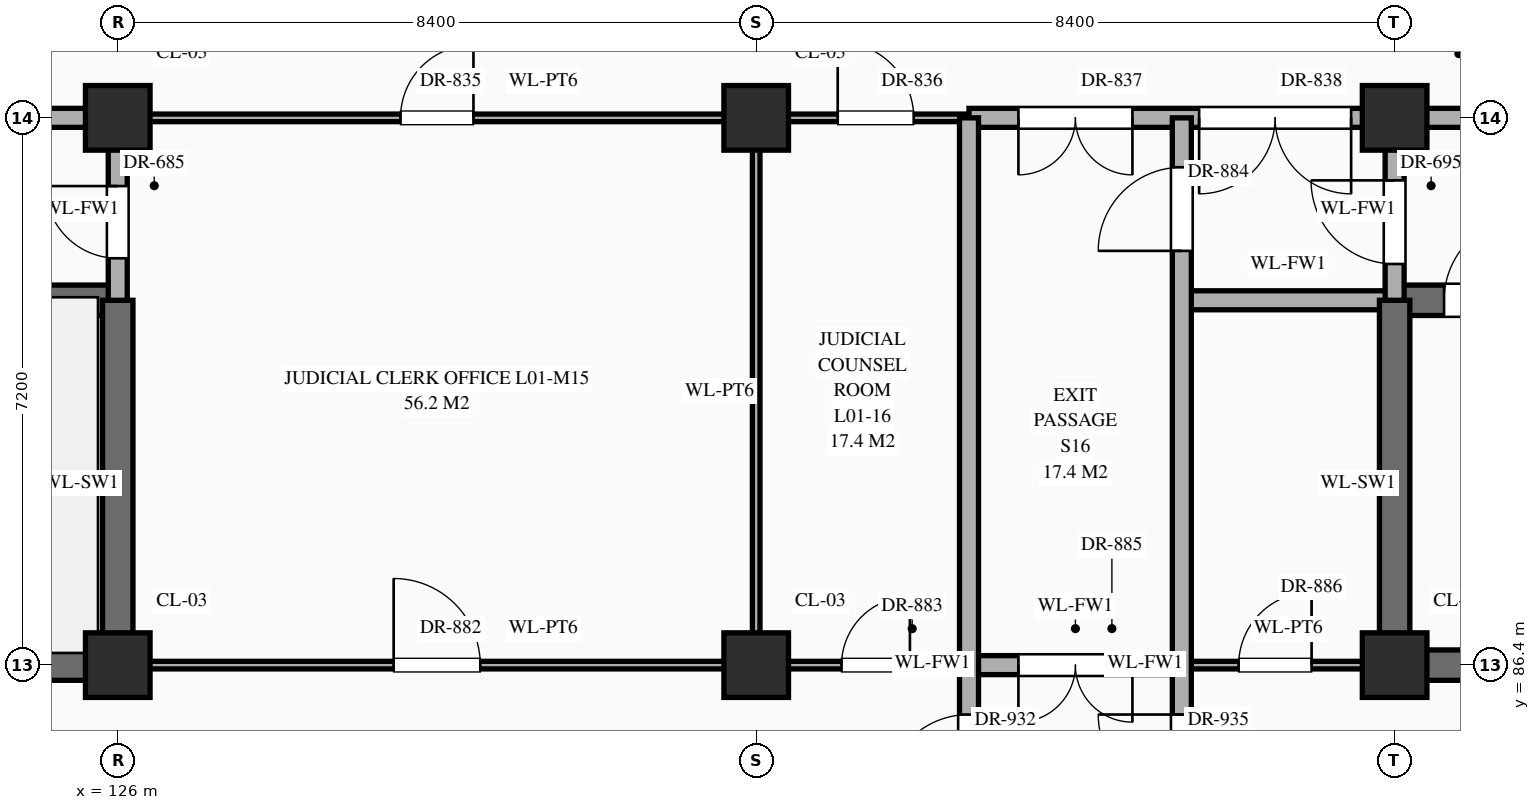
"""IFC4 building model, lengths in metres.
Left out: names, types, materials, properties, quantities, classifications, styles, units other than length and angle.
Written with IfcOpenShell. Run it as: python <this file> out.ifc"""

import sys

from ifc_helpers import new_model, si_unit, direction, frame, frame_2d, origin, origin_2d, place, context, subcontext, project, spatial, rectangle, extrude, element, fill, save


model = new_model("IFC4")
c1 = context("Model", 3, precision=1e-05, world=origin(), true_north=direction((0.0, 1.0)))
c2 = subcontext(c1, "Body", "Model", "MODEL_VIEW")
j1 = project(units=[si_unit("LENGTHUNIT", "METRE"), si_unit("PLANEANGLEUNIT", "RADIAN")], contexts=[c1])
p1 = place(None, origin())
s1 = spatial("IfcSite", under=j1, at=p1, CompositionType="ELEMENT")
p2 = place(p1, origin())
s2 = spatial("IfcBuilding", under=s1, at=p2, CompositionType="ELEMENT")
p3 = place(p2, origin())
s3 = spatial("IfcBuildingStorey", under=s2, at=p3, CompositionType="ELEMENT", Elevation=0.0)
for number, where, z_axis, x_axis in (
    (1, (126.0, 86.4, 0.0), (0.0, 0.0, 1.0), (1.0, 0.0, 0.0)),
    (2, (126.0, 93.6, 0.0), (0.0, 0.0, 1.0), (1.0, 0.0, 0.0)),
    (3, (134.4, 86.4, 0.0), (0.0, 0.0, 1.0), (1.0, 0.0, 0.0)),
    (4, (134.4, 93.6, 0.0), (0.0, 0.0, 1.0), (1.0, 0.0, 0.0)),
    (5, (142.8, 86.4, 0.0), (0.0, 0.0, 1.0), (1.0, 0.0, 0.0)),
    (6, (142.8, 93.6, 0.0), (0.0, 0.0, 1.0), (1.0, 0.0, 0.0)),
):
    element("IfcColumn", number, at=place(p3, frame(where, z_axis=z_axis, x_axis=x_axis)), inside=s3, PredefinedType="COLUMN", context=c2, shape_type="SweptSolid", body=[
        extrude(rectangle(XDim=0.85, YDim=0.85, at=origin_2d()), origin(), (0.0, 0.0, 1.0), 5.4),
    ])
p4 = place(p3, frame((117.6, 86.4, 0.0), z_axis=(0.0, 0.0, 1.0), x_axis=(1.0, 0.0, 0.0)))
e7 = element("IfcWall", 7, at=p4, inside=s3, PredefinedType="SHEAR", context=c2, shape_type="SweptSolid", body=[
    extrude(rectangle(XDim=8.4, YDim=0.4, at=frame_2d((4.2, 0.0))), origin(), (0.0, 0.0, 1.0), 5.12),
])
p5 = place(p3, frame((126.0, 86.4, 0.0), z_axis=(0.0, 0.0, 1.0), x_axis=(1.0, 0.0, 0.0)))
e8 = element("IfcWall", 8, at=p5, inside=s3, PredefinedType="STANDARD", context=c2, shape_type="SweptSolid", body=[
    extrude(rectangle(XDim=11.2, YDim=0.1, at=frame_2d((5.6, 0.0))), origin(), (0.0, 0.0, 1.0), 4.27),
])
p6 = place(p5, frame((3.63, 0.0, 0.0)))
e9 = element("IfcOpeningElement", 9, at=p6, cuts=e8, PredefinedType="OPENING", context=c2, shape_type="SweptSolid", body=[
    extrude(rectangle(XDim=1.14, YDim=2.4, at=frame_2d((0.57, 1.2))), frame((0.0, 0.062, 0.0), z_axis=(0.0, -1.0, 0.0), x_axis=(1.0, 0.0, 0.0)), (0.0, 0.0, 1.0), 0.124),
])
p7 = place(p5, frame((9.522, 0.0, 0.0)))
e10 = element("IfcOpeningElement", 10, at=p7, cuts=e8, PredefinedType="OPENING", context=c2, shape_type="SweptSolid", body=[
    extrude(rectangle(XDim=0.9, YDim=2.15, at=frame_2d((0.45, 1.075))), frame((0.0, 0.062, 0.0), z_axis=(0.0, -1.0, 0.0), x_axis=(1.0, 0.0, 0.0)), (0.0, 0.0, 1.0), 0.124),
])
p8 = place(p3, frame((137.2, 86.4, 0.0), z_axis=(0.0, 0.0, 1.0), x_axis=(1.0, 0.0, 0.0)))
e11 = element("IfcWall", 11, at=p8, inside=s3, PredefinedType="STANDARD", context=c2, shape_type="SweptSolid", body=[
    extrude(rectangle(XDim=2.8, YDim=0.25, at=frame_2d((1.4, 0.0))), origin(), (0.0, 0.0, 1.0), 4.27),
])
p9 = place(p8, frame((0.65, 0.0, 0.0)))
e12 = element("IfcOpeningElement", 12, at=p9, cuts=e11, PredefinedType="OPENING", context=c2, shape_type="SweptSolid", body=[
    extrude(rectangle(XDim=1.5, YDim=2.25, at=frame_2d((0.75, 1.125))), frame((0.0, 0.137, 0.0), z_axis=(0.0, -1.0, 0.0), x_axis=(1.0, 0.0, 0.0)), (0.0, 0.0, 1.0), 0.274),
])
p10 = place(p3, frame((140.0, 86.4, 0.0), z_axis=(0.0, 0.0, 1.0), x_axis=(1.0, 0.0, 0.0)))
e13 = element("IfcWall", 13, at=p10, inside=s3, PredefinedType="STANDARD", context=c2, shape_type="SweptSolid", body=[
    extrude(rectangle(XDim=2.8, YDim=0.1, at=frame_2d((1.4, 0.0))), origin(), (0.0, 0.0, 1.0), 4.27),
])
p11 = place(p10, frame((0.748, 0.0, 0.0)))
e14 = element("IfcOpeningElement", 14, at=p11, cuts=e13, PredefinedType="OPENING", context=c2, shape_type="SweptSolid", body=[
    extrude(rectangle(XDim=0.96, YDim=2.2, at=frame_2d((0.48, 1.1))), frame((0.0, 0.062, 0.0), z_axis=(0.0, -1.0, 0.0), x_axis=(1.0, 0.0, 0.0)), (0.0, 0.0, 1.0), 0.124),
])
p12 = place(p3, frame((142.8, 86.4, 0.0), z_axis=(0.0, 0.0, 1.0), x_axis=(1.0, 0.0, 0.0)))
e15 = element("IfcWall", 15, at=p12, inside=s3, PredefinedType="SHEAR", context=c2, shape_type="SweptSolid", body=[
    extrude(rectangle(XDim=8.4, YDim=0.4, at=frame_2d((4.2, 0.0))), origin(), (0.0, 0.0, 1.0), 5.12),
])
p13 = place(p3, frame((117.6, 91.2, 0.0), z_axis=(0.0, 0.0, 1.0), x_axis=(1.0, 0.0, 0.0)))
e16 = element("IfcWall", 16, at=p13, inside=s3, PredefinedType="SHEAR", context=c2, shape_type="SweptSolid", body=[
    extrude(rectangle(XDim=8.4, YDim=0.4, at=frame_2d((4.2, 0.0))), origin(), (0.0, 0.0, 1.0), 5.12),
])
p14 = place(p13, frame((0.65, 0.0, 0.0)))
e17 = element("IfcOpeningElement", 17, at=p14, cuts=e16, PredefinedType="OPENING", context=c2, shape_type="SweptSolid", body=[
    extrude(rectangle(XDim=1.1, YDim=2.2, at=frame_2d((0.55, 1.1))), frame((0.0, 0.212, 0.0), z_axis=(0.0, -1.0, 0.0), x_axis=(1.0, 0.0, 0.0)), (0.0, 0.0, 1.0), 0.424),
])
p15 = place(p3, frame((140.0, 91.2, 0.0), z_axis=(0.0, 0.0, 1.0), x_axis=(1.0, 0.0, 0.0)))
e18 = element("IfcWall", 18, at=p15, inside=s3, PredefinedType="STANDARD", context=c2, shape_type="SweptSolid", body=[
    extrude(rectangle(XDim=2.8, YDim=0.25, at=frame_2d((1.4, 0.0))), origin(), (0.0, 0.0, 1.0), 5.12),
])
p16 = place(p3, frame((142.8, 91.2, 0.0), z_axis=(0.0, 0.0, 1.0), x_axis=(1.0, 0.0, 0.0)))
e19 = element("IfcWall", 19, at=p16, inside=s3, PredefinedType="SHEAR", context=c2, shape_type="SweptSolid", body=[
    extrude(rectangle(XDim=8.4, YDim=0.4, at=frame_2d((4.2, 0.0))), origin(), (0.0, 0.0, 1.0), 5.12),
])
p17 = place(p16, frame((0.65, 0.0, 0.0)))
e20 = element("IfcOpeningElement", 20, at=p17, cuts=e19, PredefinedType="OPENING", context=c2, shape_type="SweptSolid", body=[
    extrude(rectangle(XDim=1.1, YDim=2.2, at=frame_2d((0.55, 1.1))), frame((0.0, 0.212, 0.0), z_axis=(0.0, -1.0, 0.0), x_axis=(1.0, 0.0, 0.0)), (0.0, 0.0, 1.0), 0.424),
])
p18 = place(p3, frame((100.8, 93.6, 0.0), z_axis=(0.0, 0.0, 1.0), x_axis=(1.0, 0.0, 0.0)))
e21 = element("IfcWall", 21, at=p18, inside=s3, PredefinedType="STANDARD", context=c2, shape_type="SweptSolid", body=[
    extrude(rectangle(XDim=25.2, YDim=0.25, at=frame_2d((12.6, 0.0))), origin(), (0.0, 0.0, 1.0), 4.27),
])
p19 = place(p18, frame((3.2, 0.0, 0.0)))
e22 = element("IfcOpeningElement", 22, at=p19, cuts=e21, PredefinedType="OPENING", context=c2, shape_type="SweptSolid", body=[
    extrude(rectangle(XDim=2.0, YDim=2.4, at=frame_2d((1.0, 1.2))), frame((0.0, 0.137, 0.0), z_axis=(0.0, -1.0, 0.0), x_axis=(1.0, 0.0, 0.0)), (0.0, 0.0, 1.0), 0.274),
])
p20 = place(p18, frame((20.212, 0.0, 0.0)))
e23 = element("IfcOpeningElement", 23, at=p20, cuts=e21, PredefinedType="OPENING", context=c2, shape_type="SweptSolid", body=[
    extrude(rectangle(XDim=1.6, YDim=2.3, at=frame_2d((0.8, 1.15))), frame((0.0, 0.137, 0.0), z_axis=(0.0, -1.0, 0.0), x_axis=(1.0, 0.0, 0.0)), (0.0, 0.0, 1.0), 0.274),
])
p21 = place(p18, frame((9.485, 0.0, 0.0)))
e24 = element("IfcOpeningElement", 24, at=p21, cuts=e21, PredefinedType="OPENING", context=c2, shape_type="SweptSolid", body=[
    extrude(rectangle(XDim=1.0, YDim=2.2, at=frame_2d((0.5, 1.1))), frame((0.0, 0.137, 0.0), z_axis=(0.0, -1.0, 0.0), x_axis=(1.0, 0.0, 0.0)), (0.0, 0.0, 1.0), 0.274),
])
p22 = place(p18, frame((12.125, 0.0, 0.0)))
e25 = element("IfcOpeningElement", 25, at=p22, cuts=e21, PredefinedType="OPENING", context=c2, shape_type="SweptSolid", body=[
    extrude(rectangle(XDim=0.95, YDim=2.15, at=frame_2d((0.475, 1.075))), frame((0.0, 0.137, 0.0), z_axis=(0.0, -1.0, 0.0), x_axis=(1.0, 0.0, 0.0)), (0.0, 0.0, 1.0), 0.274),
])
p23 = place(p18, frame((14.665, 0.0, 0.0)))
e26 = element("IfcOpeningElement", 26, at=p23, cuts=e21, PredefinedType="OPENING", context=c2, shape_type="SweptSolid", body=[
    extrude(rectangle(XDim=1.1, YDim=2.2, at=frame_2d((0.55, 1.1))), frame((0.0, 0.137, 0.0), z_axis=(0.0, -1.0, 0.0), x_axis=(1.0, 0.0, 0.0)), (0.0, 0.0, 1.0), 0.274),
])
p24 = place(p3, frame((126.0, 93.6, 0.0), z_axis=(0.0, 0.0, 1.0), x_axis=(1.0, 0.0, 0.0)))
e27 = element("IfcWall", 27, at=p24, inside=s3, PredefinedType="STANDARD", context=c2, shape_type="SweptSolid", body=[
    extrude(rectangle(XDim=11.2, YDim=0.1, at=frame_2d((5.6, 0.0))), origin(), (0.0, 0.0, 1.0), 4.27),
])
p25 = place(p24, frame((3.72, 0.0, 0.0)))
e28 = element("IfcOpeningElement", 28, at=p25, cuts=e27, PredefinedType="OPENING", context=c2, shape_type="SweptSolid", body=[
    extrude(rectangle(XDim=0.96, YDim=2.2, at=frame_2d((0.48, 1.1))), frame((0.0, 0.062, 0.0), z_axis=(0.0, -1.0, 0.0), x_axis=(1.0, 0.0, 0.0)), (0.0, 0.0, 1.0), 0.124),
])
p26 = place(p24, frame((9.472, 0.0, 0.0)))
e29 = element("IfcOpeningElement", 29, at=p26, cuts=e27, PredefinedType="OPENING", context=c2, shape_type="SweptSolid", body=[
    extrude(rectangle(XDim=1.0, YDim=2.25, at=frame_2d((0.5, 1.125))), frame((0.0, 0.062, 0.0), z_axis=(0.0, -1.0, 0.0), x_axis=(1.0, 0.0, 0.0)), (0.0, 0.0, 1.0), 0.124),
])
p27 = place(p3, frame((137.2, 93.6, 0.0), z_axis=(0.0, 0.0, 1.0), x_axis=(1.0, 0.0, 0.0)))
e30 = element("IfcWall", 30, at=p27, inside=s3, PredefinedType="STANDARD", context=c2, shape_type="SweptSolid", body=[
    extrude(rectangle(XDim=14.0, YDim=0.25, at=frame_2d((7.0, 0.0))), origin(), (0.0, 0.0, 1.0), 4.27),
])
p28 = place(p27, frame((8.8, 0.0, 0.0)))
e31 = element("IfcOpeningElement", 31, at=p28, cuts=e30, PredefinedType="OPENING", context=c2, shape_type="SweptSolid", body=[
    extrude(rectangle(XDim=2.0, YDim=2.4, at=frame_2d((1.0, 1.2))), frame((0.0, 0.137, 0.0), z_axis=(0.0, -1.0, 0.0), x_axis=(1.0, 0.0, 0.0)), (0.0, 0.0, 1.0), 0.274),
])
p29 = place(p27, frame((0.65, 0.0, 0.0)))
e32 = element("IfcOpeningElement", 32, at=p29, cuts=e30, PredefinedType="OPENING", context=c2, shape_type="SweptSolid", body=[
    extrude(rectangle(XDim=1.5, YDim=2.25, at=frame_2d((0.75, 1.125))), frame((0.0, 0.137, 0.0), z_axis=(0.0, -1.0, 0.0), x_axis=(1.0, 0.0, 0.0)), (0.0, 0.0, 1.0), 0.274),
])
p30 = place(p27, frame((3.028, 0.0, 0.0)))
e33 = element("IfcOpeningElement", 33, at=p30, cuts=e30, PredefinedType="OPENING", context=c2, shape_type="SweptSolid", body=[
    extrude(rectangle(XDim=2.0, YDim=2.4, at=frame_2d((1.0, 1.2))), frame((0.0, 0.137, 0.0), z_axis=(0.0, -1.0, 0.0), x_axis=(1.0, 0.0, 0.0)), (0.0, 0.0, 1.0), 0.274),
])
p31 = place(p3, frame((126.0, 86.4, 0.0), z_axis=(0.0, 0.0, 1.0), x_axis=(0.0, 1.0, 0.0)))
e34 = element("IfcWall", 34, at=p31, inside=s3, PredefinedType="SHEAR", context=c2, shape_type="SweptSolid", body=[
    extrude(rectangle(XDim=4.8, YDim=0.4, at=frame_2d((2.4, 0.0))), origin(), (0.0, 0.0, 1.0), 5.12),
])
p32 = place(p3, frame((126.0, 91.2, 0.0), z_axis=(0.0, 0.0, 1.0), x_axis=(0.0, 1.0, 0.0)))
e35 = element("IfcWall", 35, at=p32, inside=s3, PredefinedType="STANDARD", context=c2, shape_type="SweptSolid", body=[
    extrude(rectangle(XDim=2.4, YDim=0.25, at=frame_2d((1.2, 0.0))), origin(), (0.0, 0.0, 1.0), 4.37),
])
p33 = place(p32, frame((0.552, 0.0, 0.0)))
e36 = element("IfcOpeningElement", 36, at=p33, cuts=e35, PredefinedType="OPENING", context=c2, shape_type="SweptSolid", body=[
    extrude(rectangle(XDim=0.95, YDim=2.15, at=frame_2d((0.475, 1.075))), frame((0.0, 0.137, 0.0), z_axis=(0.0, -1.0, 0.0), x_axis=(1.0, 0.0, 0.0)), (0.0, 0.0, 1.0), 0.274),
])
p34 = place(p3, frame((134.4, 86.4, 0.0), z_axis=(0.0, 0.0, 1.0), x_axis=(0.0, 1.0, 0.0)))
e37 = element("IfcWall", 37, at=p34, inside=s3, PredefinedType="STANDARD", context=c2, shape_type="SweptSolid", body=[
    extrude(rectangle(XDim=7.2, YDim=0.1, at=frame_2d((3.6, 0.0))), origin(), (0.0, 0.0, 1.0), 4.37),
])
p35 = place(p3, frame((137.2, 79.24, 0.0), z_axis=(0.0, 0.0, 1.0), x_axis=(0.0, 1.0, 0.0)))
e38 = element("IfcWall", 38, at=p35, inside=s3, PredefinedType="STANDARD", context=c2, shape_type="SweptSolid", body=[
    extrude(rectangle(XDim=14.36, YDim=0.25, at=frame_2d((7.18, 0.0))), origin(), (0.0, 0.0, 1.0), 5.12),
])
p36 = place(p35, frame((5.41, 0.0, 0.0)))
e39 = element("IfcOpeningElement", 39, at=p36, cuts=e38, PredefinedType="OPENING", context=c2, shape_type="SweptSolid", body=[
    extrude(rectangle(XDim=1.1, YDim=2.2, at=frame_2d((0.55, 1.1))), frame((0.0, 0.137, 0.0), z_axis=(0.0, -1.0, 0.0), x_axis=(1.0, 0.0, 0.0)), (0.0, 0.0, 1.0), 0.274),
])
p37 = place(p3, frame((140.0, 79.24, 0.0), z_axis=(0.0, 0.0, 1.0), x_axis=(0.0, 1.0, 0.0)))
e40 = element("IfcWall", 40, at=p37, inside=s3, PredefinedType="STANDARD", context=c2, shape_type="SweptSolid", body=[
    extrude(rectangle(XDim=14.36, YDim=0.25, at=frame_2d((7.18, 0.0))), origin(), (0.0, 0.0, 1.0), 5.12),
])
p38 = place(p37, frame((12.61, 0.0, 0.0)))
e41 = element("IfcOpeningElement", 41, at=p38, cuts=e40, PredefinedType="OPENING", context=c2, shape_type="SweptSolid", body=[
    extrude(rectangle(XDim=1.1, YDim=2.2, at=frame_2d((0.55, 1.1))), frame((0.0, 0.137, 0.0), z_axis=(0.0, -1.0, 0.0), x_axis=(1.0, 0.0, 0.0)), (0.0, 0.0, 1.0), 0.274),
])
p39 = place(p37, frame((5.41, 0.0, 0.0)))
e42 = element("IfcOpeningElement", 42, at=p39, cuts=e40, PredefinedType="OPENING", context=c2, shape_type="SweptSolid", body=[
    extrude(rectangle(XDim=1.1, YDim=2.2, at=frame_2d((0.55, 1.1))), frame((0.0, 0.137, 0.0), z_axis=(0.0, -1.0, 0.0), x_axis=(1.0, 0.0, 0.0)), (0.0, 0.0, 1.0), 0.274),
])
p40 = place(p3, frame((142.8, 86.4, 0.0), z_axis=(0.0, 0.0, 1.0), x_axis=(0.0, 1.0, 0.0)))
e43 = element("IfcWall", 43, at=p40, inside=s3, PredefinedType="SHEAR", context=c2, shape_type="SweptSolid", body=[
    extrude(rectangle(XDim=4.8, YDim=0.4, at=frame_2d((2.4, 0.0))), origin(), (0.0, 0.0, 1.0), 5.12),
])
p41 = place(p3, frame((142.8, 91.2, 0.0), z_axis=(0.0, 0.0, 1.0), x_axis=(0.0, 1.0, 0.0)))
e44 = element("IfcWall", 44, at=p41, inside=s3, PredefinedType="STANDARD", context=c2, shape_type="SweptSolid", body=[
    extrude(rectangle(XDim=2.4, YDim=0.25, at=frame_2d((1.2, 0.0))), origin(), (0.0, 0.0, 1.0), 4.37),
])
p42 = place(p41, frame((0.478, 0.0, 0.0)))
e45 = element("IfcOpeningElement", 45, at=p42, cuts=e44, PredefinedType="OPENING", context=c2, shape_type="SweptSolid", body=[
    extrude(rectangle(XDim=1.1, YDim=2.2, at=frame_2d((0.55, 1.1))), frame((0.0, 0.137, 0.0), z_axis=(0.0, -1.0, 0.0), x_axis=(1.0, 0.0, 0.0)), (0.0, 0.0, 1.0), 0.274),
])
p43 = place(p17, origin())
e46 = element("IfcDoor", 46, at=p43, inside=s3, OperationType="SINGLE_SWING_RIGHT", PredefinedType="DOOR", context=c2, shape_type="SweptSolid", body=[
    extrude(rectangle(XDim=1.1, YDim=2.2, at=frame_2d((0.55, 1.1))), frame((0.0, 0.025, 0.0), z_axis=(0.0, -1.0, 0.0), x_axis=(1.0, 0.0, 0.0)), (0.0, 0.0, 1.0), 0.05),
])
fill(e20, e46)
p44 = place(p33, origin())
e47 = element("IfcDoor", 47, at=p44, inside=s3, OperationType="SINGLE_SWING_RIGHT", PredefinedType="DOOR", context=c2, shape_type="SweptSolid", body=[
    extrude(rectangle(XDim=0.95, YDim=2.15, at=frame_2d((0.475, 1.075))), frame((0.0, 0.025, 0.0), z_axis=(0.0, -1.0, 0.0), x_axis=(1.0, 0.0, 0.0)), (0.0, 0.0, 1.0), 0.05),
])
fill(e36, e47)
p45 = place(p42, origin())
e48 = element("IfcDoor", 48, at=p45, inside=s3, OperationType="SINGLE_SWING_RIGHT", PredefinedType="DOOR", context=c2, shape_type="SweptSolid", body=[
    extrude(rectangle(XDim=1.1, YDim=2.2, at=frame_2d((0.55, 1.1))), frame((0.0, 0.025, 0.0), z_axis=(0.0, -1.0, 0.0), x_axis=(1.0, 0.0, 0.0)), (0.0, 0.0, 1.0), 0.05),
])
fill(e45, e48)
p46 = place(p25, origin())
e49 = element("IfcDoor", 49, at=p46, inside=s3, OperationType="SINGLE_SWING_RIGHT", PredefinedType="DOOR", context=c2, shape_type="SweptSolid", body=[
    extrude(rectangle(XDim=0.96, YDim=2.2, at=frame_2d((0.48, 1.1))), frame((0.0, 0.025, 0.0), z_axis=(0.0, -1.0, 0.0), x_axis=(1.0, 0.0, 0.0)), (0.0, 0.0, 1.0), 0.05),
])
fill(e28, e49)
p47 = place(p26, origin())
e50 = element("IfcDoor", 50, at=p47, inside=s3, OperationType="SINGLE_SWING_LEFT", PredefinedType="DOOR", context=c2, shape_type="SweptSolid", body=[
    extrude(rectangle(XDim=1.0, YDim=2.25, at=frame_2d((0.5, 1.125))), frame((0.0, 0.025, 0.0), z_axis=(0.0, -1.0, 0.0), x_axis=(1.0, 0.0, 0.0)), (0.0, 0.0, 1.0), 0.05),
])
fill(e29, e50)
p48 = place(p29, frame((1.5, 0.0, 0.0), z_axis=(0.0, 0.0, 1.0), x_axis=(-1.0, 0.0, 0.0)))
e51 = element("IfcDoor", 51, at=p48, inside=s3, OperationType="DOUBLE_DOOR_SINGLE_SWING", PredefinedType="DOOR", context=c2, shape_type="SweptSolid", body=[
    extrude(rectangle(XDim=1.5, YDim=2.25, at=frame_2d((0.75, 1.125))), frame((0.0, 0.025, 0.0), z_axis=(0.0, -1.0, 0.0), x_axis=(1.0, 0.0, 0.0)), (0.0, 0.0, 1.0), 0.05),
])
fill(e32, e51)
p49 = place(p30, frame((2.0, 0.0, 0.0), z_axis=(0.0, 0.0, 1.0), x_axis=(-1.0, 0.0, 0.0)))
e52 = element("IfcDoor", 52, at=p49, inside=s3, OperationType="DOUBLE_DOOR_SINGLE_SWING", PredefinedType="DOOR", context=c2, shape_type="SweptSolid", body=[
    extrude(rectangle(XDim=2.0, YDim=2.4, at=frame_2d((1.0, 1.2))), frame((0.0, 0.025, 0.0), z_axis=(0.0, -1.0, 0.0), x_axis=(1.0, 0.0, 0.0)), (0.0, 0.0, 1.0), 0.05),
])
fill(e33, e52)
p50 = place(p6, origin())
e53 = element("IfcDoor", 53, at=p50, inside=s3, OperationType="SINGLE_SWING_LEFT", PredefinedType="DOOR", context=c2, shape_type="SweptSolid", body=[
    extrude(rectangle(XDim=1.14, YDim=2.4, at=frame_2d((0.57, 1.2))), frame((0.0, 0.025, 0.0), z_axis=(0.0, -1.0, 0.0), x_axis=(1.0, 0.0, 0.0)), (0.0, 0.0, 1.0), 0.05),
])
fill(e9, e53)
p51 = place(p7, origin())
e54 = element("IfcDoor", 54, at=p51, inside=s3, OperationType="SINGLE_SWING_RIGHT", PredefinedType="DOOR", context=c2, shape_type="SweptSolid", body=[
    extrude(rectangle(XDim=0.9, YDim=2.15, at=frame_2d((0.45, 1.075))), frame((0.0, 0.025, 0.0), z_axis=(0.0, -1.0, 0.0), x_axis=(1.0, 0.0, 0.0)), (0.0, 0.0, 1.0), 0.05),
])
fill(e10, e54)
p52 = place(p38, origin())
e55 = element("IfcDoor", 55, at=p52, inside=s3, OperationType="SINGLE_SWING_LEFT", PredefinedType="DOOR", context=c2, shape_type="SweptSolid", body=[
    extrude(rectangle(XDim=1.1, YDim=2.2, at=frame_2d((0.55, 1.1))), frame((0.0, 0.025, 0.0), z_axis=(0.0, -1.0, 0.0), x_axis=(1.0, 0.0, 0.0)), (0.0, 0.0, 1.0), 0.05),
])
fill(e41, e55)
p53 = place(p9, frame((1.5, 0.0, 0.0), z_axis=(0.0, 0.0, 1.0), x_axis=(-1.0, 0.0, 0.0)))
e56 = element("IfcDoor", 56, at=p53, inside=s3, OperationType="DOUBLE_DOOR_SINGLE_SWING", PredefinedType="DOOR", context=c2, shape_type="SweptSolid", body=[
    extrude(rectangle(XDim=1.5, YDim=2.25, at=frame_2d((0.75, 1.125))), frame((0.0, 0.025, 0.0), z_axis=(0.0, -1.0, 0.0), x_axis=(1.0, 0.0, 0.0)), (0.0, 0.0, 1.0), 0.05),
])
fill(e12, e56)
p54 = place(p11, origin())
e57 = element("IfcDoor", 57, at=p54, inside=s3, OperationType="SINGLE_SWING_RIGHT", PredefinedType="DOOR", context=c2, shape_type="SweptSolid", body=[
    extrude(rectangle(XDim=0.96, YDim=2.2, at=frame_2d((0.48, 1.1))), frame((0.0, 0.025, 0.0), z_axis=(0.0, -1.0, 0.0), x_axis=(1.0, 0.0, 0.0)), (0.0, 0.0, 1.0), 0.05),
])
fill(e14, e57)
p55 = place(p36, origin())
e58 = element("IfcDoor", 58, at=p55, inside=s3, OperationType="SINGLE_SWING_LEFT", PredefinedType="DOOR", context=c2, shape_type="SweptSolid", body=[
    extrude(rectangle(XDim=1.1, YDim=2.2, at=frame_2d((0.55, 1.1))), frame((0.0, 0.025, 0.0), z_axis=(0.0, -1.0, 0.0), x_axis=(1.0, 0.0, 0.0)), (0.0, 0.0, 1.0), 0.05),
])
fill(e39, e58)
p56 = place(p39, origin())
e59 = element("IfcDoor", 59, at=p56, inside=s3, OperationType="SINGLE_SWING_RIGHT", PredefinedType="DOOR", context=c2, shape_type="SweptSolid", body=[
    extrude(rectangle(XDim=1.1, YDim=2.2, at=frame_2d((0.55, 1.1))), frame((0.0, 0.025, 0.0), z_axis=(0.0, -1.0, 0.0), x_axis=(1.0, 0.0, 0.0)), (0.0, 0.0, 1.0), 0.05),
])
fill(e42, e59)
save(model, sys.argv[1])
